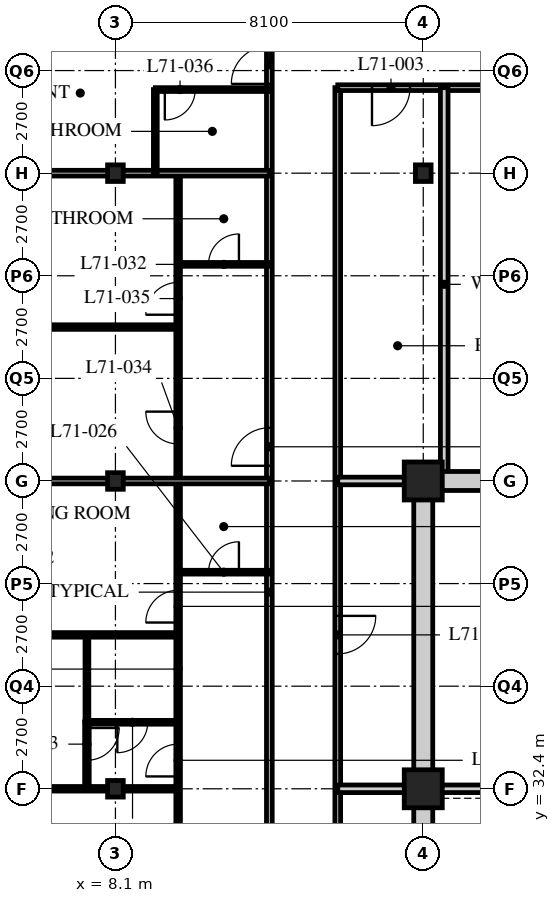
"""IFC4 building model, lengths in metres.
Left out: names, types, materials, properties, quantities, classifications, styles, units other than length and angle.
Written with IfcOpenShell. Run it as: python <this file> out.ifc"""

import sys

from ifc_helpers import new_model, si_unit, direction, frame, frame_2d, origin, origin_2d, place, context, subcontext, project, spatial, rectangle, hollow_rectangle, i_section, extrude, element, fill, save


model = new_model("IFC4")
c1 = context("Model", 3, precision=1e-05, world=origin(), true_north=direction((0.0, 1.0)))
c2 = subcontext(c1, "Body", "Model", "MODEL_VIEW")
j1 = project(units=[si_unit("LENGTHUNIT", "METRE"), si_unit("PLANEANGLEUNIT", "RADIAN")], contexts=[c1])
p1 = place(None, origin())
s1 = spatial("IfcSite", under=j1, at=p1, CompositionType="ELEMENT")
p2 = place(p1, origin())
s2 = spatial("IfcBuilding", under=s1, at=p2, CompositionType="ELEMENT")
p3 = place(p2, frame((0.0, 0.0, 277.5)))
s3 = spatial("IfcBuildingStorey", under=s2, at=p3, CompositionType="ELEMENT", Elevation=277.5)
for number, where, z_axis, x_axis in (
    (1, (8.1, 32.4, 0.0), (0.0, 0.0, 1.0), (1.0, 0.0, 0.0)),
    (2, (8.1, 40.5, 0.0), (0.0, 0.0, 1.0), (1.0, 0.0, 0.0)),
    (3, (8.1, 48.6, 0.0), (0.0, 0.0, 1.0), (1.0, 0.0, 0.0)),
):
    element("IfcColumn", number, at=place(p3, frame(where, z_axis=z_axis, x_axis=x_axis)), inside=s3, PredefinedType="COLUMN", context=c2, shape_type="SweptSolid", body=[
        extrude(i_section(OverallWidth=0.412, OverallDepth=0.437, WebThickness=0.036, FlangeThickness=0.058, FilletRadius=0.015, at=origin_2d()), origin(), (0.0, 0.0, 1.0), 3.9),
    ])
for number, where, z_axis, x_axis in (
    (4, (16.2, 32.4, 0.0), (0.0, 0.0, 1.0), (1.0, 0.0, 0.0)),
    (5, (16.2, 40.5, 0.0), (0.0, 0.0, 1.0), (1.0, 0.0, 0.0)),
):
    element("IfcColumn", number, at=place(p3, frame(where, z_axis=z_axis, x_axis=x_axis)), inside=s3, PredefinedType="COLUMN", context=c2, shape_type="SweptSolid", body=[
        extrude(hollow_rectangle(XDim=1.0, YDim=1.0, WallThickness=0.1, at=origin_2d()), origin(), (0.0, 0.0, 1.0), 3.9),
    ])
p4 = place(p3, frame((16.2, 48.6, 0.0), z_axis=(0.0, 0.0, 1.0), x_axis=(1.0, 0.0, 0.0)))
e6 = element("IfcColumn", 6, at=p4, inside=s3, PredefinedType="COLUMN", context=c2, shape_type="SweptSolid", body=[
    extrude(i_section(OverallWidth=0.412, OverallDepth=0.437, WebThickness=0.036, FlangeThickness=0.058, FilletRadius=0.015, at=origin_2d()), origin(), (0.0, 0.0, 1.0), 3.9),
])
p5 = place(p3, frame((12.15, 22.5, 0.0), z_axis=(0.0, 0.0, 1.0), x_axis=(0.0, 1.0, 0.0)))
e7 = element("IfcWall", 7, at=p5, inside=s3, PredefinedType="PARTITIONING", context=c2, shape_type="SweptSolid", body=[
    extrude(rectangle(XDim=30.15, YDim=0.15, at=frame_2d((15.075, 0.0))), origin(), (0.0, 0.0, 1.0), 3.69),
])
p6 = place(p5, frame((0.4, 0.0, 0.0)))
e8 = element("IfcOpeningElement", 8, at=p6, cuts=e7, PredefinedType="OPENING", context=c2, shape_type="SweptSolid", body=[
    extrude(rectangle(XDim=1.0, YDim=2.1, at=frame_2d((0.5, 1.05))), frame((0.0, 0.085, 0.0), z_axis=(0.0, -1.0, 0.0), x_axis=(1.0, 0.0, 0.0)), (0.0, 0.0, 1.0), 0.17),
])
p7 = place(p5, frame((18.4, 0.0, 0.0)))
e9 = element("IfcOpeningElement", 9, at=p7, cuts=e7, PredefinedType="OPENING", context=c2, shape_type="SweptSolid", body=[
    extrude(rectangle(XDim=1.0, YDim=2.1, at=frame_2d((0.5, 1.05))), frame((0.0, 0.085, 0.0), z_axis=(0.0, -1.0, 0.0), x_axis=(1.0, 0.0, 0.0)), (0.0, 0.0, 1.0), 0.17),
])
p8 = place(p5, frame((28.45, 0.0, 0.0)))
e10 = element("IfcOpeningElement", 10, at=p8, cuts=e7, PredefinedType="OPENING", context=c2, shape_type="SweptSolid", body=[
    extrude(rectangle(XDim=1.0, YDim=2.1, at=frame_2d((0.5, 1.05))), frame((0.0, 0.085, 0.0), z_axis=(0.0, -1.0, 0.0), x_axis=(1.0, 0.0, 0.0)), (0.0, 0.0, 1.0), 0.17),
])
p9 = place(p3, frame((13.95, 24.3, 0.0), z_axis=(0.0, 0.0, 1.0), x_axis=(0.0, 1.0, 0.0)))
e11 = element("IfcWall", 11, at=p9, inside=s3, PredefinedType="PARTITIONING", context=c2, shape_type="SweptSolid", body=[
    extrude(rectangle(XDim=26.55, YDim=0.15, at=frame_2d((13.275, 0.0))), origin(), (0.0, 0.0, 1.0), 3.69),
])
p10 = place(p9, frame((3.55, 0.0, 0.0)))
e12 = element("IfcOpeningElement", 12, at=p10, cuts=e11, PredefinedType="OPENING", context=c2, shape_type="SweptSolid", body=[
    extrude(rectangle(XDim=1.0, YDim=2.1, at=frame_2d((0.5, 1.05))), frame((0.0, 0.085, 0.0), z_axis=(0.0, -1.0, 0.0), x_axis=(1.0, 0.0, 0.0)), (0.0, 0.0, 1.0), 0.17),
])
p11 = place(p9, frame((11.65, 0.0, 0.0)))
e13 = element("IfcOpeningElement", 13, at=p11, cuts=e11, PredefinedType="OPENING", context=c2, shape_type="SweptSolid", body=[
    extrude(rectangle(XDim=1.0, YDim=2.1, at=frame_2d((0.5, 1.05))), frame((0.0, 0.085, 0.0), z_axis=(0.0, -1.0, 0.0), x_axis=(1.0, 0.0, 0.0)), (0.0, 0.0, 1.0), 0.17),
])
p12 = place(p3, frame((13.95, 50.85, 0.0), z_axis=(0.0, 0.0, 1.0), x_axis=(1.0, 0.0, 0.0)))
e14 = element("IfcWall", 14, at=p12, inside=s3, PredefinedType="PARTITIONING", context=c2, shape_type="SweptSolid", body=[
    extrude(rectangle(XDim=13.19, YDim=0.15, at=frame_2d((6.595, 0.0))), origin(), (0.0, 0.0, 1.0), 3.69),
])
p13 = place(p12, frame((0.901, 0.0, 0.0)))
e15 = element("IfcOpeningElement", 15, at=p13, cuts=e14, PredefinedType="OPENING", context=c2, shape_type="SweptSolid", body=[
    extrude(rectangle(XDim=1.0, YDim=2.1, at=frame_2d((0.5, 1.05))), frame((0.0, 0.085, 0.0), z_axis=(0.0, -1.0, 0.0), x_axis=(1.0, 0.0, 0.0)), (0.0, 0.0, 1.0), 0.17),
])
p14 = place(p12, frame((4.901, 0.0, 0.0)))
e16 = element("IfcOpeningElement", 16, at=p14, cuts=e14, PredefinedType="OPENING", context=c2, shape_type="SweptSolid", body=[
    extrude(rectangle(XDim=1.0, YDim=2.1, at=frame_2d((0.5, 1.05))), frame((0.0, 0.085, 0.0), z_axis=(0.0, -1.0, 0.0), x_axis=(1.0, 0.0, 0.0)), (0.0, 0.0, 1.0), 0.17),
])
p15 = place(p12, frame((10.101, 0.0, 0.0)))
e17 = element("IfcOpeningElement", 17, at=p15, cuts=e14, PredefinedType="OPENING", context=c2, shape_type="SweptSolid", body=[
    extrude(rectangle(XDim=1.0, YDim=2.1, at=frame_2d((0.5, 1.05))), frame((0.0, 0.085, 0.0), z_axis=(0.0, -1.0, 0.0), x_axis=(1.0, 0.0, 0.0)), (0.0, 0.0, 1.0), 0.17),
])
p16 = place(p3, frame((13.95, 32.4, 0.0), z_axis=(0.0, 0.0, 1.0), x_axis=(1.0, 0.0, 0.0)))
e18 = element("IfcWall", 18, at=p16, inside=s3, PredefinedType="SOLIDWALL", context=c2, shape_type="SweptSolid", body=[
    extrude(rectangle(XDim=2.25, YDim=0.2, at=frame_2d((1.125, 0.0))), origin(), (0.0, 0.0, 1.0), 3.078),
])
p17 = place(p3, frame((16.752, 50.85, 0.0), z_axis=(0.0, 0.0, 1.0), x_axis=(0.0, -1.0, 0.0)))
e19 = element("IfcWall", 19, at=p17, inside=s3, PredefinedType="SOLIDWALL", context=c2, shape_type="SweptSolid", body=[
    extrude(rectangle(XDim=10.35, YDim=0.2, at=frame_2d((5.175, 0.0))), origin(), (0.0, 0.0, 1.0), 3.69),
])
p18 = place(p3, frame((13.95, 40.5, 0.0), z_axis=(0.0, 0.0, 1.0), x_axis=(1.0, 0.0, 0.0)))
e20 = element("IfcWall", 20, at=p18, inside=s3, PredefinedType="SOLIDWALL", context=c2, shape_type="SweptSolid", body=[
    extrude(rectangle(XDim=2.25, YDim=0.2, at=frame_2d((1.125, 0.0))), origin(), (0.0, 0.0, 1.0), 3.078),
])
p19 = place(p3, frame((9.75, 22.5, 0.0), z_axis=(0.0, 0.0, 1.0), x_axis=(0.0, 1.0, 0.0)))
e21 = element("IfcWall", 21, at=p19, inside=s3, PredefinedType="PARTITIONING", context=c2, shape_type="SweptSolid", body=[
    extrude(rectangle(XDim=26.1, YDim=0.12, at=frame_2d((13.05, 0.0))), origin(), (0.0, 0.0, 1.0), 3.69),
])
p20 = place(p19, frame((0.975, 0.0, 0.0)))
e22 = element("IfcOpeningElement", 22, at=p20, cuts=e21, PredefinedType="OPENING", context=c2, shape_type="SweptSolid", body=[
    extrude(rectangle(XDim=0.85, YDim=2.1, at=frame_2d((0.425, 1.05))), frame((0.0, 0.07, 0.0), z_axis=(0.0, -1.0, 0.0), x_axis=(1.0, 0.0, 0.0)), (0.0, 0.0, 1.0), 0.14),
])
p21 = place(p19, frame((10.225, 0.0, 0.0)))
e23 = element("IfcOpeningElement", 23, at=p21, cuts=e21, PredefinedType="OPENING", context=c2, shape_type="SweptSolid", body=[
    extrude(rectangle(XDim=0.85, YDim=2.1, at=frame_2d((0.425, 1.05))), frame((0.0, 0.07, 0.0), z_axis=(0.0, -1.0, 0.0), x_axis=(1.0, 0.0, 0.0)), (0.0, 0.0, 1.0), 0.14),
])
p22 = place(p19, frame((14.275, 0.0, 0.0)))
e24 = element("IfcOpeningElement", 24, at=p22, cuts=e21, PredefinedType="OPENING", context=c2, shape_type="SweptSolid", body=[
    extrude(rectangle(XDim=0.85, YDim=2.1, at=frame_2d((0.425, 1.05))), frame((0.0, 0.07, 0.0), z_axis=(0.0, -1.0, 0.0), x_axis=(1.0, 0.0, 0.0)), (0.0, 0.0, 1.0), 0.14),
])
p23 = place(p19, frame((18.975, 0.0, 0.0)))
e25 = element("IfcOpeningElement", 25, at=p23, cuts=e21, PredefinedType="OPENING", context=c2, shape_type="SweptSolid", body=[
    extrude(rectangle(XDim=0.85, YDim=2.1, at=frame_2d((0.425, 1.05))), frame((0.0, 0.07, 0.0), z_axis=(0.0, -1.0, 0.0), x_axis=(1.0, 0.0, 0.0)), (0.0, 0.0, 1.0), 0.14),
])
p24 = place(p19, frame((22.375, 0.0, 0.0)))
e26 = element("IfcOpeningElement", 26, at=p24, cuts=e21, PredefinedType="OPENING", context=c2, shape_type="SweptSolid", body=[
    extrude(rectangle(XDim=0.85, YDim=2.1, at=frame_2d((0.425, 1.05))), frame((0.0, 0.07, 0.0), z_axis=(0.0, -1.0, 0.0), x_axis=(1.0, 0.0, 0.0)), (0.0, 0.0, 1.0), 0.14),
])
p25 = place(p3, frame((12.15, 38.1, 0.0), z_axis=(0.0, 0.0, 1.0), x_axis=(-1.0, 0.0, 0.0)))
e27 = element("IfcWall", 27, at=p25, inside=s3, PredefinedType="PARTITIONING", context=c2, shape_type="SweptSolid", body=[
    extrude(rectangle(XDim=2.4, YDim=0.1, at=frame_2d((1.2, 0.0))), origin(), (0.0, 0.0, 1.0), 3.69),
])
p26 = place(p25, frame((0.8, 0.0, 0.0)))
e28 = element("IfcOpeningElement", 28, at=p26, cuts=e27, PredefinedType="OPENING", context=c2, shape_type="SweptSolid", body=[
    extrude(rectangle(XDim=0.8, YDim=2.1, at=frame_2d((0.4, 1.05))), frame((0.0, 0.06, 0.0), z_axis=(0.0, -1.0, 0.0), x_axis=(1.0, 0.0, 0.0)), (0.0, 0.0, 1.0), 0.12),
])
p27 = place(p3, frame((9.75, 34.15, 0.0), z_axis=(0.0, 0.0, 1.0), x_axis=(-1.0, 0.0, 0.0)))
e29 = element("IfcWall", 29, at=p27, inside=s3, PredefinedType="PARTITIONING", context=c2, shape_type="SweptSolid", body=[
    extrude(rectangle(XDim=2.4, YDim=0.1, at=frame_2d((1.2, 0.0))), origin(), (0.0, 0.0, 1.0), 3.69),
])
p28 = place(p27, frame((0.8, 0.0, 0.0)))
e30 = element("IfcOpeningElement", 30, at=p28, cuts=e29, PredefinedType="OPENING", context=c2, shape_type="SweptSolid", body=[
    extrude(rectangle(XDim=0.8, YDim=2.1, at=frame_2d((0.4, 1.05))), frame((0.0, 0.06, 0.0), z_axis=(0.0, -1.0, 0.0), x_axis=(1.0, 0.0, 0.0)), (0.0, 0.0, 1.0), 0.12),
])
p29 = place(p3, frame((7.35, 34.15, 0.0), z_axis=(0.0, 0.0, 1.0), x_axis=(0.0, 1.0, 0.0)))
e31 = element("IfcWall", 31, at=p29, inside=s3, PredefinedType="PARTITIONING", context=c2, shape_type="SweptSolid", body=[
    extrude(rectangle(XDim=2.3, YDim=0.1, at=frame_2d((1.15, 0.0))), origin(), (0.0, 0.0, 1.0), 3.69),
])
p30 = place(p3, frame((9.75, 32.4, 0.0), z_axis=(0.0, 0.0, 1.0), x_axis=(-1.0, 0.0, 0.0)))
e32 = element("IfcWall", 32, at=p30, inside=s3, PredefinedType="PARTITIONING", context=c2, shape_type="SweptSolid", body=[
    extrude(rectangle(XDim=9.45, YDim=0.12, at=frame_2d((4.725, 0.0))), origin(), (0.0, 0.0, 1.0), 3.078),
])
p31 = place(p3, frame((9.75, 36.45, 0.0), z_axis=(0.0, 0.0, 1.0), x_axis=(-1.0, 0.0, 0.0)))
e33 = element("IfcWall", 33, at=p31, inside=s3, PredefinedType="PARTITIONING", context=c2, shape_type="SweptSolid", body=[
    extrude(rectangle(XDim=9.45, YDim=0.12, at=frame_2d((4.725, 0.0))), origin(), (0.0, 0.0, 1.0), 3.69),
])
p32 = place(p3, frame((12.15, 40.5, 0.0), z_axis=(0.0, 0.0, 1.0), x_axis=(-1.0, 0.0, 0.0)))
e34 = element("IfcWall", 34, at=p32, inside=s3, PredefinedType="PARTITIONING", context=c2, shape_type="SweptSolid", body=[
    extrude(rectangle(XDim=11.85, YDim=0.15, at=frame_2d((5.925, 0.0))), origin(), (0.0, 0.0, 1.0), 3.078),
])
p33 = place(p3, frame((12.15, 46.2, 0.0), z_axis=(0.0, 0.0, 1.0), x_axis=(-1.0, 0.0, 0.0)))
e35 = element("IfcWall", 35, at=p33, inside=s3, PredefinedType="PARTITIONING", context=c2, shape_type="SweptSolid", body=[
    extrude(rectangle(XDim=2.4, YDim=0.1, at=frame_2d((1.2, 0.0))), origin(), (0.0, 0.0, 1.0), 3.69),
])
p34 = place(p33, frame((0.8, 0.0, 0.0)))
e36 = element("IfcOpeningElement", 36, at=p34, cuts=e35, PredefinedType="OPENING", context=c2, shape_type="SweptSolid", body=[
    extrude(rectangle(XDim=0.8, YDim=2.1, at=frame_2d((0.4, 1.05))), frame((0.0, 0.06, 0.0), z_axis=(0.0, -1.0, 0.0), x_axis=(1.0, 0.0, 0.0)), (0.0, 0.0, 1.0), 0.12),
])
p35 = place(p3, frame((9.75, 44.55, 0.0), z_axis=(0.0, 0.0, 1.0), x_axis=(-1.0, 0.0, 0.0)))
e37 = element("IfcWall", 37, at=p35, inside=s3, PredefinedType="PARTITIONING", context=c2, shape_type="SweptSolid", body=[
    extrude(rectangle(XDim=9.45, YDim=0.12, at=frame_2d((4.725, 0.0))), origin(), (0.0, 0.0, 1.0), 3.69),
])
p36 = place(p3, frame((12.15, 48.6, 0.0), z_axis=(0.0, 0.0, 1.0), x_axis=(-1.0, 0.0, 0.0)))
e38 = element("IfcWall", 38, at=p36, inside=s3, PredefinedType="PARTITIONING", context=c2, shape_type="SweptSolid", body=[
    extrude(rectangle(XDim=11.85, YDim=0.15, at=frame_2d((5.925, 0.0))), origin(), (0.0, 0.0, 1.0), 3.078),
])
p37 = place(p3, frame((9.15, 48.6, 0.0), z_axis=(0.0, 0.0, 1.0), x_axis=(0.0, 1.0, 0.0)))
e39 = element("IfcWall", 39, at=p37, inside=s3, PredefinedType="PARTITIONING", context=c2, shape_type="SweptSolid", body=[
    extrude(rectangle(XDim=2.2, YDim=0.1, at=frame_2d((1.1, 0.0))), origin(), (0.0, 0.0, 1.0), 3.69),
])
p38 = place(p3, frame((12.15, 50.8, 0.0), z_axis=(0.0, 0.0, 1.0), x_axis=(-1.0, 0.0, 0.0)))
e40 = element("IfcWall", 40, at=p38, inside=s3, PredefinedType="PARTITIONING", context=c2, shape_type="SweptSolid", body=[
    extrude(rectangle(XDim=3.0, YDim=0.1, at=frame_2d((1.5, 0.0))), origin(), (0.0, 0.0, 1.0), 3.69),
])
p39 = place(p38, frame((1.95, 0.0, 0.0)))
e41 = element("IfcOpeningElement", 41, at=p39, cuts=e40, PredefinedType="OPENING", context=c2, shape_type="SweptSolid", body=[
    extrude(rectangle(XDim=0.8, YDim=2.1, at=frame_2d((0.4, 1.05))), frame((0.0, 0.06, 0.0), z_axis=(0.0, -1.0, 0.0), x_axis=(1.0, 0.0, 0.0)), (0.0, 0.0, 1.0), 0.12),
])
p40 = place(p3, frame((7.35, 32.4, 0.0), z_axis=(0.0, 0.0, 1.0), x_axis=(0.0, 1.0, 0.0)))
e42 = element("IfcWall", 42, at=p40, inside=s3, PredefinedType="PARTITIONING", context=c2, shape_type="SweptSolid", body=[
    extrude(rectangle(XDim=1.76, YDim=0.12, at=frame_2d((0.88, 0.0))), origin(), (0.0, 0.0, 1.0), 3.69),
])
p41 = place(p40, frame((0.75, 0.0, 0.0)))
e43 = element("IfcOpeningElement", 43, at=p41, cuts=e42, PredefinedType="OPENING", context=c2, shape_type="SweptSolid", body=[
    extrude(rectangle(XDim=0.85, YDim=2.1, at=frame_2d((0.425, 1.05))), frame((0.0, 0.07, 0.0), z_axis=(0.0, -1.0, 0.0), x_axis=(1.0, 0.0, 0.0)), (0.0, 0.0, 1.0), 0.14),
])
p42 = place(p3, frame((15.95, 40.5, 0.0), z_axis=(0.0, 0.0, 1.0), x_axis=(1.0, 0.0, 0.0)))
e44 = element("IfcWall", 44, at=p42, inside=s3, PredefinedType="SOLIDWALL", context=c2, shape_type="SweptSolid", body=[
    extrude(rectangle(XDim=24.55, YDim=0.5, at=frame_2d((12.275, 0.0))), origin(), (0.0, 0.0, 1.0), 3.04),
])
p43 = place(p42, frame((11.5, 0.0, 0.0)))
e45 = element("IfcOpeningElement", 45, at=p43, cuts=e44, PredefinedType="OPENING", context=c2, shape_type="SweptSolid", body=[
    extrude(rectangle(XDim=1.8, YDim=2.4, at=frame_2d((0.9, 1.2))), frame((0.0, 0.26, 0.0), z_axis=(0.0, -1.0, 0.0), x_axis=(1.0, 0.0, 0.0)), (0.0, 0.0, 1.0), 0.52),
])
p44 = place(p3, frame((16.2, 24.55, 0.0), z_axis=(0.0, 0.0, 1.0), x_axis=(0.0, 1.0, 0.0)))
e46 = element("IfcWall", 46, at=p44, inside=s3, PredefinedType="SOLIDWALL", context=c2, shape_type="SweptSolid", body=[
    extrude(rectangle(XDim=15.7, YDim=0.5, at=frame_2d((7.85, 0.0))), origin(), (0.0, 0.0, 1.0), 3.078),
])
p45 = place(p3, frame((16.45, 32.4, 0.0), z_axis=(0.0, 0.0, 1.0), x_axis=(1.0, 0.0, 0.0)))
e47 = element("IfcWall", 47, at=p45, inside=s3, PredefinedType="SOLIDWALL", context=c2, shape_type="SweptSolid", body=[
    extrude(rectangle(XDim=7.95, YDim=0.2, at=frame_2d((3.975, 0.0))), origin(), (0.0, 0.0, 1.0), 3.078),
])
p46 = place(p11, origin())
e48 = element("IfcDoor", 48, at=p46, inside=s3, OperationType="SINGLE_SWING_LEFT", PredefinedType="DOOR", context=c2, shape_type="SweptSolid", body=[
    extrude(rectangle(XDim=1.0, YDim=2.1, at=frame_2d((0.5, 1.05))), frame((0.0, 0.025, 0.0), z_axis=(0.0, -1.0, 0.0), x_axis=(1.0, 0.0, 0.0)), (0.0, 0.0, 1.0), 0.05),
])
fill(e13, e48)
p47 = place(p13, origin())
e49 = element("IfcDoor", 49, at=p47, inside=s3, OperationType="SINGLE_SWING_RIGHT", PredefinedType="DOOR", context=c2, shape_type="SweptSolid", body=[
    extrude(rectangle(XDim=1.0, YDim=2.1, at=frame_2d((0.5, 1.05))), frame((0.0, 0.025, 0.0), z_axis=(0.0, -1.0, 0.0), x_axis=(1.0, 0.0, 0.0)), (0.0, 0.0, 1.0), 0.05),
])
fill(e15, e49)
p48 = place(p26, origin())
e50 = element("IfcDoor", 50, at=p48, inside=s3, OperationType="SINGLE_SWING_RIGHT", PredefinedType="DOOR", context=c2, shape_type="SweptSolid", body=[
    extrude(rectangle(XDim=0.8, YDim=2.1, at=frame_2d((0.4, 1.05))), frame((0.0, 0.025, 0.0), z_axis=(0.0, -1.0, 0.0), x_axis=(1.0, 0.0, 0.0)), (0.0, 0.0, 1.0), 0.05),
])
fill(e28, e50)
p49 = place(p28, origin())
e51 = element("IfcDoor", 51, at=p49, inside=s3, OperationType="SINGLE_SWING_RIGHT", PredefinedType="DOOR", context=c2, shape_type="SweptSolid", body=[
    extrude(rectangle(XDim=0.8, YDim=2.1, at=frame_2d((0.4, 1.05))), frame((0.0, 0.025, 0.0), z_axis=(0.0, -1.0, 0.0), x_axis=(1.0, 0.0, 0.0)), (0.0, 0.0, 1.0), 0.05),
])
fill(e30, e51)
p50 = place(p21, origin())
e52 = element("IfcDoor", 52, at=p50, inside=s3, OperationType="SINGLE_SWING_LEFT", PredefinedType="DOOR", context=c2, shape_type="SweptSolid", body=[
    extrude(rectangle(XDim=0.85, YDim=2.1, at=frame_2d((0.425, 1.05))), frame((0.0, 0.025, 0.0), z_axis=(0.0, -1.0, 0.0), x_axis=(1.0, 0.0, 0.0)), (0.0, 0.0, 1.0), 0.05),
])
fill(e23, e52)
p51 = place(p22, origin())
e53 = element("IfcDoor", 53, at=p51, inside=s3, OperationType="SINGLE_SWING_LEFT", PredefinedType="DOOR", context=c2, shape_type="SweptSolid", body=[
    extrude(rectangle(XDim=0.85, YDim=2.1, at=frame_2d((0.425, 1.05))), frame((0.0, 0.025, 0.0), z_axis=(0.0, -1.0, 0.0), x_axis=(1.0, 0.0, 0.0)), (0.0, 0.0, 1.0), 0.05),
])
fill(e24, e53)
p52 = place(p34, origin())
e54 = element("IfcDoor", 54, at=p52, inside=s3, OperationType="SINGLE_SWING_RIGHT", PredefinedType="DOOR", context=c2, shape_type="SweptSolid", body=[
    extrude(rectangle(XDim=0.8, YDim=2.1, at=frame_2d((0.4, 1.05))), frame((0.0, 0.025, 0.0), z_axis=(0.0, -1.0, 0.0), x_axis=(1.0, 0.0, 0.0)), (0.0, 0.0, 1.0), 0.05),
])
fill(e36, e54)
p53 = place(p7, origin())
e55 = element("IfcDoor", 55, at=p53, inside=s3, OperationType="SINGLE_SWING_LEFT", PredefinedType="DOOR", context=c2, shape_type="SweptSolid", body=[
    extrude(rectangle(XDim=1.0, YDim=2.1, at=frame_2d((0.5, 1.05))), frame((0.0, 0.025, 0.0), z_axis=(0.0, -1.0, 0.0), x_axis=(1.0, 0.0, 0.0)), (0.0, 0.0, 1.0), 0.05),
])
fill(e9, e55)
p54 = place(p23, origin())
e56 = element("IfcDoor", 56, at=p54, inside=s3, OperationType="SINGLE_SWING_RIGHT", PredefinedType="DOOR", context=c2, shape_type="SweptSolid", body=[
    extrude(rectangle(XDim=0.85, YDim=2.1, at=frame_2d((0.425, 1.05))), frame((0.0, 0.025, 0.0), z_axis=(0.0, -1.0, 0.0), x_axis=(1.0, 0.0, 0.0)), (0.0, 0.0, 1.0), 0.05),
])
fill(e25, e56)
p55 = place(p24, origin())
e57 = element("IfcDoor", 57, at=p55, inside=s3, OperationType="SINGLE_SWING_LEFT", PredefinedType="DOOR", context=c2, shape_type="SweptSolid", body=[
    extrude(rectangle(XDim=0.85, YDim=2.1, at=frame_2d((0.425, 1.05))), frame((0.0, 0.025, 0.0), z_axis=(0.0, -1.0, 0.0), x_axis=(1.0, 0.0, 0.0)), (0.0, 0.0, 1.0), 0.05),
])
fill(e26, e57)
p56 = place(p39, origin())
e58 = element("IfcDoor", 58, at=p56, inside=s3, OperationType="SINGLE_SWING_RIGHT", PredefinedType="DOOR", context=c2, shape_type="SweptSolid", body=[
    extrude(rectangle(XDim=0.8, YDim=2.1, at=frame_2d((0.4, 1.05))), frame((0.0, 0.025, 0.0), z_axis=(0.0, -1.0, 0.0), x_axis=(1.0, 0.0, 0.0)), (0.0, 0.0, 1.0), 0.05),
])
fill(e41, e58)
p57 = place(p8, origin())
e59 = element("IfcDoor", 59, at=p57, inside=s3, OperationType="SINGLE_SWING_LEFT", PredefinedType="DOOR", context=c2, shape_type="SweptSolid", body=[
    extrude(rectangle(XDim=1.0, YDim=2.1, at=frame_2d((0.5, 1.05))), frame((0.0, 0.025, 0.0), z_axis=(0.0, -1.0, 0.0), x_axis=(1.0, 0.0, 0.0)), (0.0, 0.0, 1.0), 0.05),
])
fill(e10, e59)
p58 = place(p41, origin())
e60 = element("IfcDoor", 60, at=p58, inside=s3, OperationType="SINGLE_SWING_LEFT", PredefinedType="DOOR", context=c2, shape_type="SweptSolid", body=[
    extrude(rectangle(XDim=0.85, YDim=2.1, at=frame_2d((0.425, 1.05))), frame((0.0, 0.025, 0.0), z_axis=(0.0, -1.0, 0.0), x_axis=(1.0, 0.0, 0.0)), (0.0, 0.0, 1.0), 0.05),
])
fill(e43, e60)
save(model, sys.argv[1])
